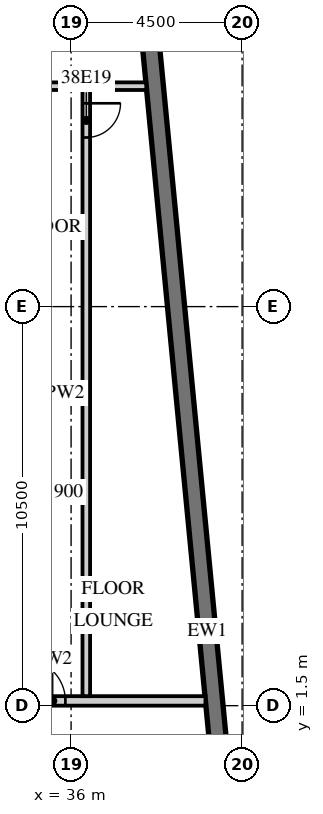
"""IFC4 building model, lengths in metres.
Left out: names, types, materials, properties, quantities, classifications, styles, units other than length and angle.
Written with IfcOpenShell. Run it as: python <this file> out.ifc"""

import sys

from ifc_helpers import new_model, si_unit, direction, frame, frame_2d, origin, place, context, subcontext, project, spatial, rectangle, extrude, element, fill, save


model = new_model("IFC4")
c1 = context("Model", 3, precision=1e-05, world=origin(), true_north=direction((0.0, 1.0)))
c2 = subcontext(c1, "Body", "Model", "MODEL_VIEW")
j1 = project(units=[si_unit("LENGTHUNIT", "METRE"), si_unit("PLANEANGLEUNIT", "RADIAN")], contexts=[c1])
p1 = place(None, origin())
s1 = spatial("IfcSite", under=j1, at=p1, CompositionType="ELEMENT")
p2 = place(p1, origin())
s2 = spatial("IfcBuilding", under=s1, at=p2, CompositionType="ELEMENT")
p3 = place(p2, frame((0.0, 0.0, 166.9)))
s3 = spatial("IfcBuildingStorey", under=s2, at=p3, CompositionType="ELEMENT", Elevation=166.9)
p4 = place(p3, frame((41.214, -13.466, 0.0), z_axis=(0.0, 0.0, 1.0), x_axis=(-0.095847314626, 0.995396047952, 0.0)))
e1 = element("IfcWall", 1, at=p4, inside=s3, PredefinedType="SOLIDWALL", context=c2, shape_type="SweptSolid", body=[
    extrude(rectangle(XDim=34.0, YDim=0.45, at=frame_2d((17.0, 0.0))), origin(), (0.0, 0.0, 1.0), 3.02),
])
p5 = place(p4, frame((3.869, 0.0, 0.45)))
e2 = element("IfcOpeningElement", 2, at=p5, cuts=e1, PredefinedType="OPENING", context=c2, shape_type="SweptSolid", body=[
    extrude(rectangle(XDim=3.3, YDim=2.25, at=frame_2d((1.65, 1.125))), frame((0.0, 0.235, 0.0), z_axis=(0.0, -1.0, 0.0), x_axis=(1.0, 0.0, 0.0)), (0.0, 0.0, 1.0), 0.47),
])
p6 = place(p4, frame((8.39, 0.0, 0.45)))
e3 = element("IfcOpeningElement", 3, at=p6, cuts=e1, PredefinedType="OPENING", context=c2, shape_type="SweptSolid", body=[
    extrude(rectangle(XDim=3.3, YDim=2.25, at=frame_2d((1.65, 1.125))), frame((0.0, 0.235, 0.0), z_axis=(0.0, -1.0, 0.0), x_axis=(1.0, 0.0, 0.0)), (0.0, 0.0, 1.0), 0.47),
])
p7 = place(p3, frame((31.5, 1.625, 0.0), z_axis=(0.0, 0.0, 1.0), x_axis=(1.0, 0.0, 0.0)))
e4 = element("IfcWall", 4, at=p7, inside=s3, PredefinedType="PARTITIONING", context=c2, shape_type="SweptSolid", body=[
    extrude(rectangle(XDim=8.035, YDim=0.25, at=frame_2d((4.018, 0.0))), origin(), (0.0, 0.0, 1.0), 3.02),
])
p8 = place(p7, frame((0.625, 0.0, 0.0)))
e5 = element("IfcOpeningElement", 5, at=p8, cuts=e4, PredefinedType="OPENING", context=c2, shape_type="SweptSolid", body=[
    extrude(rectangle(XDim=1.3, YDim=2.1, at=frame_2d((0.65, 1.05))), frame((0.0, 0.135, 0.0), z_axis=(0.0, -1.0, 0.0), x_axis=(1.0, 0.0, 0.0)), (0.0, 0.0, 1.0), 0.27),
])
p9 = place(p7, frame((3.25, 0.0, 0.0)))
e6 = element("IfcOpeningElement", 6, at=p9, cuts=e4, PredefinedType="OPENING", context=c2, shape_type="SweptSolid", body=[
    extrude(rectangle(XDim=1.1, YDim=2.1, at=frame_2d((0.55, 1.05))), frame((0.0, 0.135, 0.0), z_axis=(0.0, -1.0, 0.0), x_axis=(1.0, 0.0, 0.0)), (0.0, 0.0, 1.0), 0.27),
])
p10 = place(p3, frame((36.4, 1.75, 0.0), z_axis=(0.0, 0.0, 1.0), x_axis=(0.0, 1.0, 0.0)))
e7 = element("IfcWall", 7, at=p10, inside=s3, PredefinedType="PARTITIONING", context=c2, shape_type="SweptSolid", body=[
    extrude(rectangle(XDim=15.95, YDim=0.2, at=frame_2d((7.975, 0.0))), origin(), (0.0, 0.0, 1.0), 3.02),
])
p11 = place(p10, frame((14.7, 0.0, 0.0)))
e8 = element("IfcOpeningElement", 8, at=p11, cuts=e7, PredefinedType="OPENING", context=c2, shape_type="SweptSolid", body=[
    extrude(rectangle(XDim=0.9, YDim=2.1, at=frame_2d((0.45, 1.05))), frame((0.0, 0.11, 0.0), z_axis=(0.0, -1.0, 0.0), x_axis=(1.0, 0.0, 0.0)), (0.0, 0.0, 1.0), 0.22),
])
p12 = place(p3, frame((13.6, 17.8, 0.0), z_axis=(0.0, 0.0, 1.0), x_axis=(1.0, 0.0, 0.0)))
e9 = element("IfcWall", 9, at=p12, inside=s3, PredefinedType="PARTITIONING", context=c2, shape_type="SweptSolid", body=[
    extrude(rectangle(XDim=24.378, YDim=0.2, at=frame_2d((12.189, 0.0))), origin(), (0.0, 0.0, 1.0), 3.02),
])
p13 = place(p12, frame((15.012, 0.0, 0.0)))
e10 = element("IfcOpeningElement", 10, at=p13, cuts=e9, PredefinedType="OPENING", context=c2, shape_type="SweptSolid", body=[
    extrude(rectangle(XDim=0.9, YDim=2.1, at=frame_2d((0.45, 1.05))), frame((0.0, 0.11, 0.0), z_axis=(0.0, -1.0, 0.0), x_axis=(1.0, 0.0, 0.0)), (0.0, 0.0, 1.0), 0.22),
])
p14 = place(p12, frame((6.712, 0.0, 0.0)))
e11 = element("IfcOpeningElement", 11, at=p14, cuts=e9, PredefinedType="OPENING", context=c2, shape_type="SweptSolid", body=[
    extrude(rectangle(XDim=0.9, YDim=2.1, at=frame_2d((0.45, 1.05))), frame((0.0, 0.11, 0.0), z_axis=(0.0, -1.0, 0.0), x_axis=(1.0, 0.0, 0.0)), (0.0, 0.0, 1.0), 0.22),
])
p15 = place(p9, origin())
e12 = element("IfcDoor", 12, at=p15, inside=s3, OperationType="SINGLE_SWING_LEFT", PredefinedType="DOOR", context=c2, shape_type="SweptSolid", body=[
    extrude(rectangle(XDim=1.1, YDim=2.1, at=frame_2d((0.55, 1.05))), frame((0.0, 0.025, 0.0), z_axis=(0.0, -1.0, 0.0), x_axis=(1.0, 0.0, 0.0)), (0.0, 0.0, 1.0), 0.05),
])
fill(e6, e12)
p16 = place(p11, origin())
e13 = element("IfcDoor", 13, at=p16, inside=s3, OperationType="SINGLE_SWING_RIGHT", PredefinedType="DOOR", context=c2, shape_type="SweptSolid", body=[
    extrude(rectangle(XDim=0.9, YDim=2.1, at=frame_2d((0.45, 1.05))), frame((0.0, 0.025, 0.0), z_axis=(0.0, -1.0, 0.0), x_axis=(1.0, 0.0, 0.0)), (0.0, 0.0, 1.0), 0.05),
])
fill(e8, e13)
save(model, sys.argv[1])
